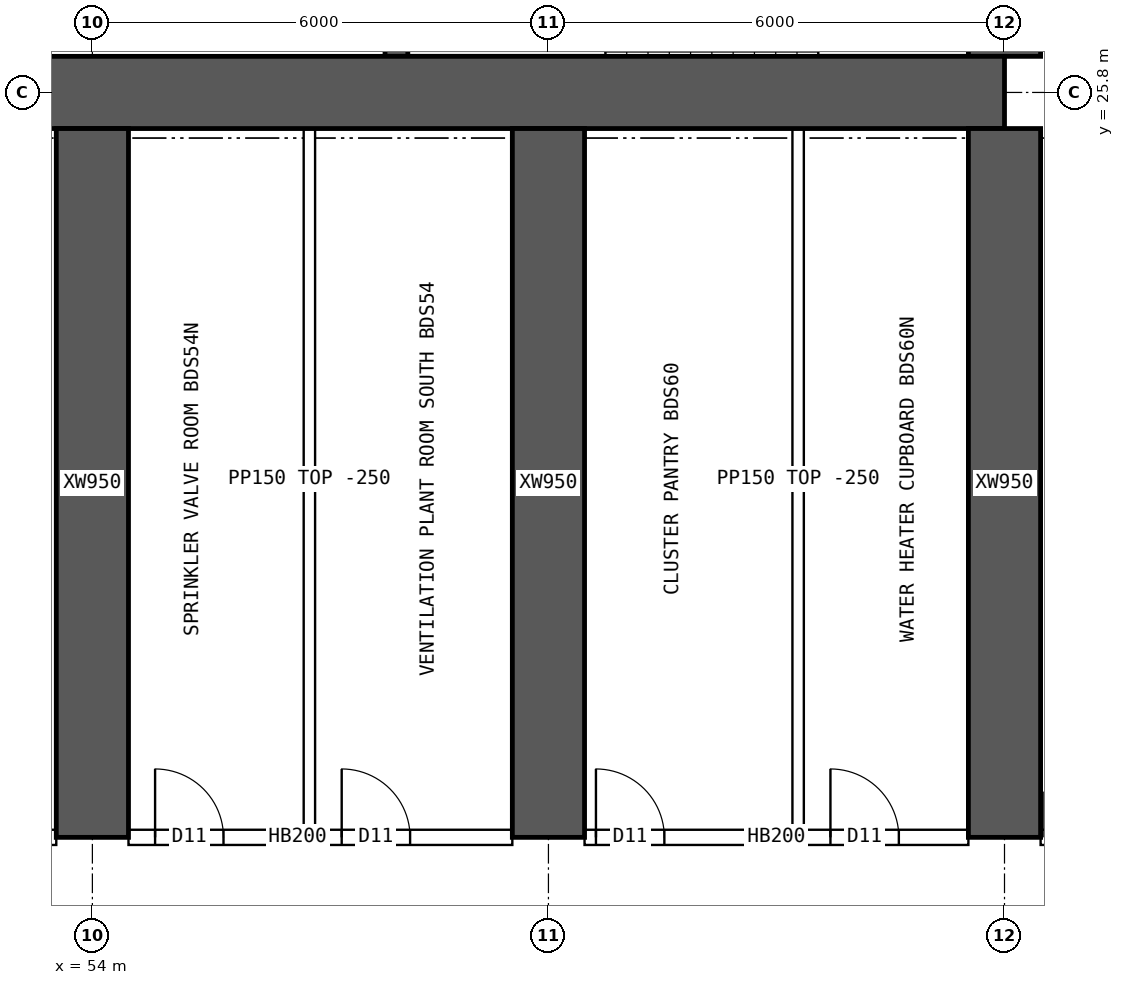
"""IFC4 building model, lengths in metres.
Left out: names, types, materials, properties, quantities, classifications, styles, units other than length and angle.
Written with IfcOpenShell. Run it as: python <this file> out.ifc"""

import sys

from ifc_helpers import new_model, si_unit, direction, frame, frame_2d, origin, place, context, subcontext, project, spatial, rectangle, extrude, element, fill, save


model = new_model("IFC4")
c1 = context("Model", 3, precision=1e-05, world=origin(), true_north=direction((0.0, 1.0)))
c2 = subcontext(c1, "Body", "Model", "MODEL_VIEW")
j1 = project(units=[si_unit("LENGTHUNIT", "METRE"), si_unit("PLANEANGLEUNIT", "RADIAN")], contexts=[c1])
p1 = place(None, origin())
s1 = spatial("IfcSite", under=j1, at=p1, CompositionType="ELEMENT")
p2 = place(p1, origin())
s2 = spatial("IfcBuilding", under=s1, at=p2, CompositionType="ELEMENT")
p3 = place(p2, frame((0.0, 0.0, 118.15)))
s3 = spatial("IfcBuildingStorey", under=s2, at=p3, CompositionType="ELEMENT", Elevation=118.15)
p4 = place(p3, frame((18.0, 25.8, 0.0), z_axis=(0.0, 0.0, 1.0), x_axis=(1.0, 0.0, 0.0)))
e1 = element("IfcWall", 1, at=p4, inside=s3, PredefinedType="SHEAR", context=c2, shape_type="SweptSolid", body=[
    extrude(rectangle(XDim=48.0, YDim=0.95, at=frame_2d((24.0, 0.0))), origin(), (0.0, 0.0, 1.0), 3.75),
])
p5 = place(p3, frame((66.0, 26.275, 0.0), z_axis=(0.0, 0.0, 1.0), x_axis=(0.0, 1.0, 0.0)))
e2 = element("IfcWall", 2, at=p5, inside=s3, PredefinedType="SHEAR", context=c2, shape_type="SweptSolid", body=[
    extrude(rectangle(XDim=11.45, YDim=0.95, at=frame_2d((5.725, 0.0))), origin(), (0.0, 0.0, 1.0), 3.75),
])
p6 = place(p5, frame((5.025, 0.0, 0.0)))
e3 = element("IfcOpeningElement", 3, at=p6, cuts=e2, PredefinedType="OPENING", context=c2, shape_type="SweptSolid", body=[
    extrude(rectangle(XDim=1.2, YDim=2.1, at=frame_2d((0.6, 1.05))), frame((0.0, 0.485, 0.0), z_axis=(0.0, -1.0, 0.0), x_axis=(1.0, 0.0, 0.0)), (0.0, 0.0, 1.0), 0.97),
])
p7 = place(p3, frame((58.0, 26.275, 0.0), z_axis=(0.0, 0.0, 1.0), x_axis=(0.0, 1.0, 0.0)))
e4 = element("IfcWall", 4, at=p7, inside=s3, PredefinedType="SHEAR", context=c2, shape_type="SweptSolid", body=[
    extrude(rectangle(XDim=3.975, YDim=0.3, at=frame_2d((1.988, 0.0))), origin(), (0.0, 0.0, 1.0), 3.75),
])
for number, where, z_axis, x_axis in (
    (5, (54.0, 16.0, 0.0), (0.0, 0.0, 1.0), (0.0, 1.0, 0.0)),
    (6, (60.0, 16.0, 0.0), (0.0, 0.0, 1.0), (0.0, 1.0, 0.0)),
    (7, (66.0, 16.0, 0.0), (0.0, 0.0, 1.0), (0.0, 1.0, 0.0)),
):
    element("IfcWall", number, at=place(p3, frame(where, z_axis=z_axis, x_axis=x_axis)), inside=s3, PredefinedType="SHEAR", context=c2, shape_type="SweptSolid", body=[
        extrude(rectangle(XDim=9.325, YDim=0.95, at=frame_2d((4.663, 0.0))), origin(), (0.0, 0.0, 1.0), 3.75),
    ])
p8 = place(p3, frame((48.475, 16.0, 0.0), z_axis=(0.0, 0.0, 1.0), x_axis=(1.0, 0.0, 0.0)))
e8 = element("IfcWall", 8, at=p8, inside=s3, PredefinedType="SOLIDWALL", context=c2, shape_type="SweptSolid", body=[
    extrude(rectangle(XDim=5.05, YDim=0.2, at=frame_2d((2.525, 0.0))), origin(), (0.0, 0.0, 1.0), 3.5),
])
p9 = place(p8, frame((0.4, 0.0, 0.0)))
e9 = element("IfcOpeningElement", 9, at=p9, cuts=e8, PredefinedType="OPENING", context=c2, shape_type="SweptSolid", body=[
    extrude(rectangle(XDim=1.0, YDim=2.1, at=frame_2d((0.5, 1.05))), frame((0.0, 0.11, 0.0), z_axis=(0.0, -1.0, 0.0), x_axis=(1.0, 0.0, 0.0)), (0.0, 0.0, 1.0), 0.22),
])
p10 = place(p3, frame((54.475, 16.0, 0.0), z_axis=(0.0, 0.0, 1.0), x_axis=(1.0, 0.0, 0.0)))
e10 = element("IfcWall", 10, at=p10, inside=s3, PredefinedType="SOLIDWALL", context=c2, shape_type="SweptSolid", body=[
    extrude(rectangle(XDim=5.05, YDim=0.2, at=frame_2d((2.525, 0.0))), origin(), (0.0, 0.0, 1.0), 3.5),
])
p11 = place(p10, frame((0.35, 0.0, 0.0)))
e11 = element("IfcOpeningElement", 11, at=p11, cuts=e10, PredefinedType="OPENING", context=c2, shape_type="SweptSolid", body=[
    extrude(rectangle(XDim=0.9, YDim=2.1, at=frame_2d((0.45, 1.05))), frame((0.0, 0.11, 0.0), z_axis=(0.0, -1.0, 0.0), x_axis=(1.0, 0.0, 0.0)), (0.0, 0.0, 1.0), 0.22),
])
p12 = place(p10, frame((2.805, 0.0, 0.0)))
e12 = element("IfcOpeningElement", 12, at=p12, cuts=e10, PredefinedType="OPENING", context=c2, shape_type="SweptSolid", body=[
    extrude(rectangle(XDim=0.9, YDim=2.1, at=frame_2d((0.45, 1.05))), frame((0.0, 0.11, 0.0), z_axis=(0.0, -1.0, 0.0), x_axis=(1.0, 0.0, 0.0)), (0.0, 0.0, 1.0), 0.22),
])
p13 = place(p3, frame((60.475, 16.0, 0.0), z_axis=(0.0, 0.0, 1.0), x_axis=(1.0, 0.0, 0.0)))
e13 = element("IfcWall", 13, at=p13, inside=s3, PredefinedType="SOLIDWALL", context=c2, shape_type="SweptSolid", body=[
    extrude(rectangle(XDim=5.05, YDim=0.2, at=frame_2d((2.525, 0.0))), origin(), (0.0, 0.0, 1.0), 3.5),
])
p14 = place(p13, frame((0.15, 0.0, 0.0)))
e14 = element("IfcOpeningElement", 14, at=p14, cuts=e13, PredefinedType="OPENING", context=c2, shape_type="SweptSolid", body=[
    extrude(rectangle(XDim=0.9, YDim=2.1, at=frame_2d((0.45, 1.05))), frame((0.0, 0.11, 0.0), z_axis=(0.0, -1.0, 0.0), x_axis=(1.0, 0.0, 0.0)), (0.0, 0.0, 1.0), 0.22),
])
p15 = place(p13, frame((3.235, 0.0, 0.0)))
e15 = element("IfcOpeningElement", 15, at=p15, cuts=e13, PredefinedType="OPENING", context=c2, shape_type="SweptSolid", body=[
    extrude(rectangle(XDim=0.9, YDim=2.1, at=frame_2d((0.45, 1.05))), frame((0.0, 0.11, 0.0), z_axis=(0.0, -1.0, 0.0), x_axis=(1.0, 0.0, 0.0)), (0.0, 0.0, 1.0), 0.22),
])
p16 = place(p3, frame((66.475, 16.0, 0.0), z_axis=(0.0, 0.0, 1.0), x_axis=(1.0, 0.0, 0.0)))
e16 = element("IfcWall", 16, at=p16, inside=s3, PredefinedType="SOLIDWALL", context=c2, shape_type="SweptSolid", body=[
    extrude(rectangle(XDim=1.925, YDim=0.2, at=frame_2d((0.962, 0.0))), origin(), (0.0, 0.0, 1.0), 3.5),
])
p17 = place(p16, frame((0.05, 0.0, 0.0)))
e17 = element("IfcOpeningElement", 17, at=p17, cuts=e16, PredefinedType="OPENING", context=c2, shape_type="SweptSolid", body=[
    extrude(rectangle(XDim=1.2, YDim=2.1, at=frame_2d((0.6, 1.05))), frame((0.0, 0.11, 0.0), z_axis=(0.0, -1.0, 0.0), x_axis=(1.0, 0.0, 0.0)), (0.0, 0.0, 1.0), 0.22),
])
for number, where, z_axis, x_axis in (
    (18, (56.855, 16.1, 0.0), (0.0, 0.0, 1.0), (0.0, 1.0, 0.0)),
    (19, (63.285, 16.1, 0.0), (0.0, 0.0, 1.0), (0.0, 1.0, 0.0)),
):
    element("IfcWall", number, at=place(p3, frame(where, z_axis=z_axis, x_axis=x_axis)), inside=s3, PredefinedType="PARTITIONING", context=c2, shape_type="SweptSolid", body=[
        extrude(rectangle(XDim=9.225, YDim=0.15, at=frame_2d((4.612, 0.0))), origin(), (0.0, 0.0, 1.0), 3.5),
    ])
p18 = place(p11, origin())
e20 = element("IfcDoor", 20, at=p18, inside=s3, OperationType="SINGLE_SWING_LEFT", PredefinedType="DOOR", context=c2, shape_type="SweptSolid", body=[
    extrude(rectangle(XDim=0.9, YDim=2.1, at=frame_2d((0.45, 1.05))), frame((0.0, 0.025, 0.0), z_axis=(0.0, -1.0, 0.0), x_axis=(1.0, 0.0, 0.0)), (0.0, 0.0, 1.0), 0.05),
])
fill(e11, e20)
p19 = place(p12, origin())
e21 = element("IfcDoor", 21, at=p19, inside=s3, OperationType="SINGLE_SWING_LEFT", PredefinedType="DOOR", context=c2, shape_type="SweptSolid", body=[
    extrude(rectangle(XDim=0.9, YDim=2.1, at=frame_2d((0.45, 1.05))), frame((0.0, 0.025, 0.0), z_axis=(0.0, -1.0, 0.0), x_axis=(1.0, 0.0, 0.0)), (0.0, 0.0, 1.0), 0.05),
])
fill(e12, e21)
p20 = place(p14, origin())
e22 = element("IfcDoor", 22, at=p20, inside=s3, OperationType="SINGLE_SWING_LEFT", PredefinedType="DOOR", context=c2, shape_type="SweptSolid", body=[
    extrude(rectangle(XDim=0.9, YDim=2.1, at=frame_2d((0.45, 1.05))), frame((0.0, 0.025, 0.0), z_axis=(0.0, -1.0, 0.0), x_axis=(1.0, 0.0, 0.0)), (0.0, 0.0, 1.0), 0.05),
])
fill(e14, e22)
p21 = place(p15, origin())
e23 = element("IfcDoor", 23, at=p21, inside=s3, OperationType="SINGLE_SWING_LEFT", PredefinedType="DOOR", context=c2, shape_type="SweptSolid", body=[
    extrude(rectangle(XDim=0.9, YDim=2.1, at=frame_2d((0.45, 1.05))), frame((0.0, 0.025, 0.0), z_axis=(0.0, -1.0, 0.0), x_axis=(1.0, 0.0, 0.0)), (0.0, 0.0, 1.0), 0.05),
])
fill(e15, e23)
save(model, sys.argv[1])
